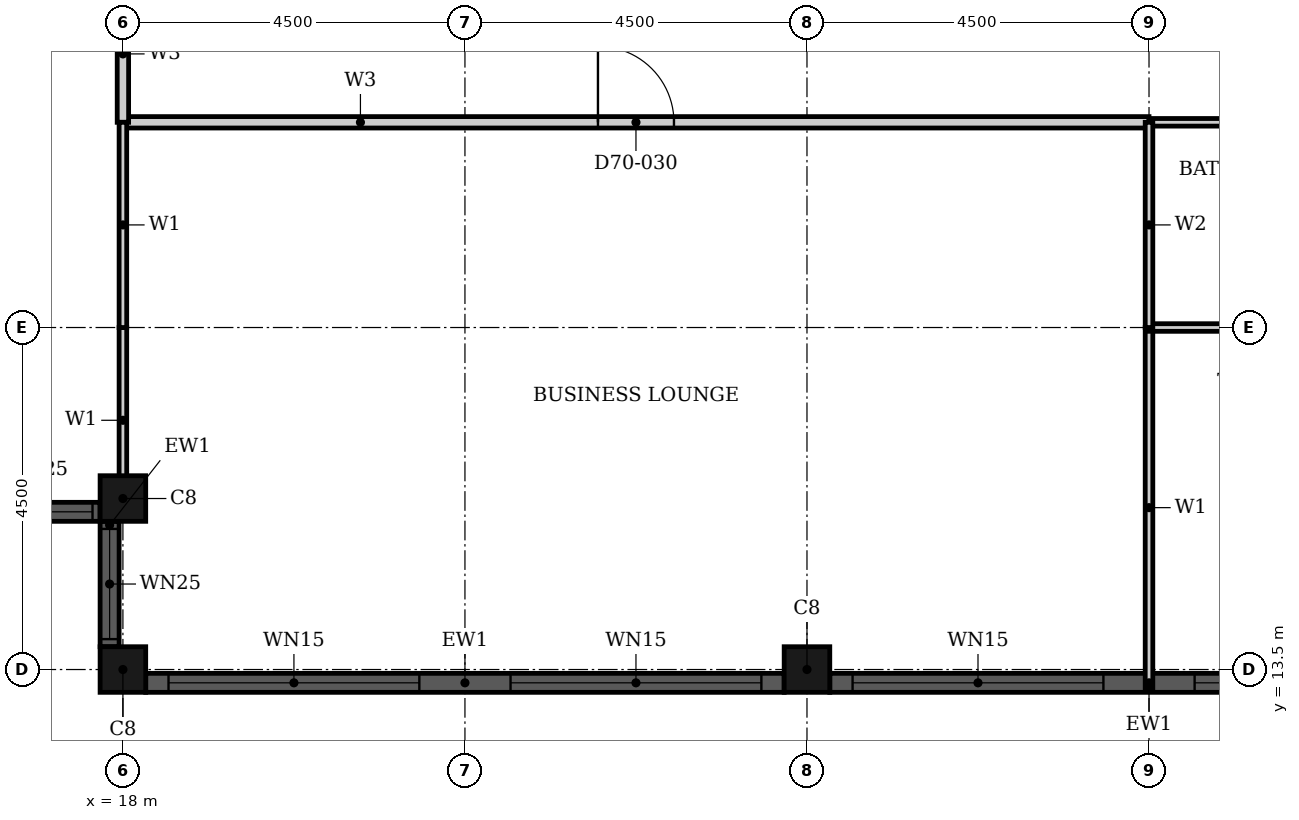
"""IFC4 building model, lengths in metres.
Left out: names, types, materials, properties, quantities, classifications, styles, units other than length and angle.
Written with IfcOpenShell. Run it as: python <this file> out.ifc"""

import sys

from ifc_helpers import new_model, si_unit, direction, frame, frame_2d, origin, origin_2d, place, context, subcontext, project, spatial, rectangle, hollow_rectangle, extrude, element, fill, save


model = new_model("IFC4")
c1 = context("Model", 3, precision=1e-05, world=origin(), true_north=direction((0.0, 1.0)))
c2 = subcontext(c1, "Body", "Model", "MODEL_VIEW")
j1 = project(units=[si_unit("LENGTHUNIT", "METRE"), si_unit("PLANEANGLEUNIT", "RADIAN")], contexts=[c1])
p1 = place(None, origin())
s1 = spatial("IfcSite", under=j1, at=p1, CompositionType="ELEMENT")
p2 = place(p1, origin())
s2 = spatial("IfcBuilding", under=s1, at=p2, CompositionType="ELEMENT")
p3 = place(p2, frame((0.0, 0.0, 274.9)))
s3 = spatial("IfcBuildingStorey", under=s2, at=p3, CompositionType="ELEMENT", Elevation=274.9)
for number, where, z_axis, x_axis in (
    (1, (18.0, 15.75, 0.0), (0.0, 0.0, 1.0), (1.0, 0.0, 0.0)),
    (2, (18.0, 13.5, 0.0), (0.0, 0.0, 1.0), (1.0, 0.0, 0.0)),
    (3, (27.0, 13.5, 0.0), (0.0, 0.0, 1.0), (1.0, 0.0, 0.0)),
):
    element("IfcColumn", number, at=place(p3, frame(where, z_axis=z_axis, x_axis=x_axis)), inside=s3, PredefinedType="COLUMN", context=c2, shape_type="SweptSolid", body=[
        extrude(hollow_rectangle(XDim=0.6, YDim=0.6, WallThickness=0.02, at=origin_2d()), origin(), (0.0, 0.0, 1.0), 3.7),
    ])
p4 = place(p3, frame((16.05, 15.575, 0.0), z_axis=(0.0, 0.0, 1.0), x_axis=(1.0, 0.0, 0.0)))
e4 = element("IfcWall", 4, at=p4, inside=s3, PredefinedType="SOLIDWALL", context=c2, shape_type="SweptSolid", body=[
    extrude(rectangle(XDim=1.65, YDim=0.25, at=frame_2d((0.825, 0.0))), origin(), (0.0, 0.0, 1.0), 3.7),
])
p5 = place(p4, frame((0.1, 0.0, 0.9)))
e5 = element("IfcOpeningElement", 5, at=p5, cuts=e4, PredefinedType="OPENING", context=c2, shape_type="SweptSolid", body=[
    extrude(rectangle(XDim=1.45, YDim=1.85, at=frame_2d((0.725, 0.925))), frame((0.0, 0.135, 0.0), z_axis=(0.0, -1.0, 0.0), x_axis=(1.0, 0.0, 0.0)), (0.0, 0.0, 1.0), 0.27),
])
p6 = place(p3, frame((17.825, 15.45, 0.0), z_axis=(0.0, 0.0, 1.0), x_axis=(0.0, -1.0, 0.0)))
e6 = element("IfcWall", 6, at=p6, inside=s3, PredefinedType="SOLIDWALL", context=c2, shape_type="SweptSolid", body=[
    extrude(rectangle(XDim=1.65, YDim=0.25, at=frame_2d((0.825, 0.0))), origin(), (0.0, 0.0, 1.0), 3.7),
])
p7 = place(p6, frame((0.1, 0.0, 0.9)))
e7 = element("IfcOpeningElement", 7, at=p7, cuts=e6, PredefinedType="OPENING", context=c2, shape_type="SweptSolid", body=[
    extrude(rectangle(XDim=1.45, YDim=1.85, at=frame_2d((0.725, 0.925))), frame((0.0, 0.135, 0.0), z_axis=(0.0, -1.0, 0.0), x_axis=(1.0, 0.0, 0.0)), (0.0, 0.0, 1.0), 0.27),
])
p8 = place(p3, frame((18.3, 13.325, 0.0), z_axis=(0.0, 0.0, 1.0), x_axis=(1.0, 0.0, 0.0)))
e8 = element("IfcWall", 8, at=p8, inside=s3, PredefinedType="SOLIDWALL", context=c2, shape_type="SweptSolid", body=[
    extrude(rectangle(XDim=8.4, YDim=0.25, at=frame_2d((4.2, 0.0))), origin(), (0.0, 0.0, 1.0), 3.7),
])
p9 = place(p8, frame((0.3, 0.0, 0.45)))
e9 = element("IfcOpeningElement", 9, at=p9, cuts=e8, PredefinedType="OPENING", context=c2, shape_type="SweptSolid", body=[
    extrude(rectangle(XDim=3.3, YDim=2.3, at=frame_2d((1.65, 1.15))), frame((0.0, 0.135, 0.0), z_axis=(0.0, -1.0, 0.0), x_axis=(1.0, 0.0, 0.0)), (0.0, 0.0, 1.0), 0.27),
])
p10 = place(p8, frame((4.8, 0.0, 0.45)))
e10 = element("IfcOpeningElement", 10, at=p10, cuts=e8, PredefinedType="OPENING", context=c2, shape_type="SweptSolid", body=[
    extrude(rectangle(XDim=3.3, YDim=2.3, at=frame_2d((1.65, 1.15))), frame((0.0, 0.135, 0.0), z_axis=(0.0, -1.0, 0.0), x_axis=(1.0, 0.0, 0.0)), (0.0, 0.0, 1.0), 0.27),
])
p11 = place(p3, frame((27.3, 13.325, 0.0), z_axis=(0.0, 0.0, 1.0), x_axis=(1.0, 0.0, 0.0)))
e11 = element("IfcWall", 11, at=p11, inside=s3, PredefinedType="SOLIDWALL", context=c2, shape_type="SweptSolid", body=[
    extrude(rectangle(XDim=8.4, YDim=0.25, at=frame_2d((4.2, 0.0))), origin(), (0.0, 0.0, 1.0), 3.7),
])
p12 = place(p11, frame((0.3, 0.0, 0.45)))
e12 = element("IfcOpeningElement", 12, at=p12, cuts=e11, PredefinedType="OPENING", context=c2, shape_type="SweptSolid", body=[
    extrude(rectangle(XDim=3.3, YDim=2.3, at=frame_2d((1.65, 1.15))), frame((0.0, 0.135, 0.0), z_axis=(0.0, -1.0, 0.0), x_axis=(1.0, 0.0, 0.0)), (0.0, 0.0, 1.0), 0.27),
])
p13 = place(p11, frame((4.8, 0.0, 0.45)))
e13 = element("IfcOpeningElement", 13, at=p13, cuts=e11, PredefinedType="OPENING", context=c2, shape_type="SweptSolid", body=[
    extrude(rectangle(XDim=3.3, YDim=2.3, at=frame_2d((1.65, 1.15))), frame((0.0, 0.135, 0.0), z_axis=(0.0, -1.0, 0.0), x_axis=(1.0, 0.0, 0.0)), (0.0, 0.0, 1.0), 0.27),
])
p14 = place(p3, frame((18.0, 20.7, 0.0), z_axis=(0.0, 0.0, 1.0), x_axis=(1.0, 0.0, 0.0)))
e14 = element("IfcWall", 14, at=p14, inside=s3, PredefinedType="PARTITIONING", context=c2, shape_type="SweptSolid", body=[
    extrude(rectangle(XDim=13.5, YDim=0.15, at=frame_2d((6.75, 0.0))), origin(), (0.0, 0.0, 1.0), 3.3),
])
p15 = place(p14, frame((6.25, 0.0, 0.0)))
e15 = element("IfcOpeningElement", 15, at=p15, cuts=e14, PredefinedType="OPENING", context=c2, shape_type="SweptSolid", body=[
    extrude(rectangle(XDim=1.0, YDim=2.1, at=frame_2d((0.5, 1.05))), frame((0.0, 0.085, 0.0), z_axis=(0.0, -1.0, 0.0), x_axis=(1.0, 0.0, 0.0)), (0.0, 0.0, 1.0), 0.17),
])
p16 = place(p3, frame((18.0, 20.7, 0.0), z_axis=(0.0, 0.0, 1.0), x_axis=(0.0, 1.0, 0.0)))
e16 = element("IfcWall", 16, at=p16, inside=s3, PredefinedType="PARTITIONING", context=c2, shape_type="SweptSolid", body=[
    extrude(rectangle(XDim=1.8, YDim=0.15, at=frame_2d((0.9, 0.0))), origin(), (0.0, 0.0, 1.0), 3.3),
])
p17 = place(p3, frame((18.0, 15.56, 0.0), z_axis=(0.0, 0.0, 1.0), x_axis=(0.0, 1.0, 0.0)))
e17 = element("IfcWall", 17, at=p17, inside=s3, PredefinedType="PARTITIONING", context=c2, shape_type="SweptSolid", body=[
    extrude(rectangle(XDim=2.439, YDim=0.1, at=frame_2d((1.219, 0.0))), origin(), (0.0, 0.0, 1.0), 3.3),
])
p18 = place(p3, frame((18.0, 18.0, 0.0), z_axis=(0.0, 0.0, 1.0), x_axis=(0.0, 1.0, 0.0)))
e18 = element("IfcWall", 18, at=p18, inside=s3, PredefinedType="PARTITIONING", context=c2, shape_type="SweptSolid", body=[
    extrude(rectangle(XDim=2.7, YDim=0.1, at=frame_2d((1.35, 0.0))), origin(), (0.0, 0.0, 1.0), 3.3),
])
p19 = place(p3, frame((31.5, 13.26, 0.0), z_axis=(0.0, 0.0, 1.0), x_axis=(0.0, 1.0, 0.0)))
e19 = element("IfcWall", 19, at=p19, inside=s3, PredefinedType="PARTITIONING", context=c2, shape_type="SweptSolid", body=[
    extrude(rectangle(XDim=4.74, YDim=0.1, at=frame_2d((2.37, 0.0))), origin(), (0.0, 0.0, 1.0), 3.3),
])
for number, where, z_axis, x_axis in (
    (20, (31.5, 18.0, 0.0), (0.0, 0.0, 1.0), (1.0, 0.0, 0.0)),
    (21, (31.5, 20.7, 0.0), (0.0, 0.0, 1.0), (1.0, 0.0, 0.0)),
):
    element("IfcWall", number, at=place(p3, frame(where, z_axis=z_axis, x_axis=x_axis)), inside=s3, PredefinedType="PARTITIONING", context=c2, shape_type="SweptSolid", body=[
        extrude(rectangle(XDim=2.4, YDim=0.1, at=frame_2d((1.2, 0.0))), origin(), (0.0, 0.0, 1.0), 3.3),
    ])
p20 = place(p3, frame((31.5, 18.0, 0.0), z_axis=(0.0, 0.0, 1.0), x_axis=(0.0, 1.0, 0.0)))
e22 = element("IfcWall", 22, at=p20, inside=s3, PredefinedType="PARTITIONING", context=c2, shape_type="SweptSolid", body=[
    extrude(rectangle(XDim=2.7, YDim=0.1, at=frame_2d((1.35, 0.0))), origin(), (0.0, 0.0, 1.0), 3.3),
])
p21 = place(p5, origin())
e23 = element("IfcWindow", 23, at=p21, inside=s3, PartitioningType="SINGLE_PANEL", PredefinedType="WINDOW", context=c2, shape_type="SweptSolid", body=[
    extrude(rectangle(XDim=1.45, YDim=1.85, at=frame_2d((0.725, 0.925))), frame((0.0, 0.03, 0.0), z_axis=(0.0, -1.0, 0.0), x_axis=(1.0, 0.0, 0.0)), (0.0, 0.0, 1.0), 0.06),
])
fill(e5, e23)
p22 = place(p7, origin())
e24 = element("IfcWindow", 24, at=p22, inside=s3, PartitioningType="SINGLE_PANEL", PredefinedType="WINDOW", context=c2, shape_type="SweptSolid", body=[
    extrude(rectangle(XDim=1.45, YDim=1.85, at=frame_2d((0.725, 0.925))), frame((0.0, 0.03, 0.0), z_axis=(0.0, -1.0, 0.0), x_axis=(1.0, 0.0, 0.0)), (0.0, 0.0, 1.0), 0.06),
])
fill(e7, e24)
p23 = place(p9, origin())
e25 = element("IfcWindow", 25, at=p23, inside=s3, PartitioningType="SINGLE_PANEL", PredefinedType="WINDOW", context=c2, shape_type="SweptSolid", body=[
    extrude(rectangle(XDim=3.3, YDim=2.3, at=frame_2d((1.65, 1.15))), frame((0.0, 0.03, 0.0), z_axis=(0.0, -1.0, 0.0), x_axis=(1.0, 0.0, 0.0)), (0.0, 0.0, 1.0), 0.06),
])
fill(e9, e25)
p24 = place(p10, origin())
e26 = element("IfcWindow", 26, at=p24, inside=s3, PartitioningType="SINGLE_PANEL", PredefinedType="WINDOW", context=c2, shape_type="SweptSolid", body=[
    extrude(rectangle(XDim=3.3, YDim=2.3, at=frame_2d((1.65, 1.15))), frame((0.0, 0.03, 0.0), z_axis=(0.0, -1.0, 0.0), x_axis=(1.0, 0.0, 0.0)), (0.0, 0.0, 1.0), 0.06),
])
fill(e10, e26)
p25 = place(p12, origin())
e27 = element("IfcWindow", 27, at=p25, inside=s3, PartitioningType="SINGLE_PANEL", PredefinedType="WINDOW", context=c2, shape_type="SweptSolid", body=[
    extrude(rectangle(XDim=3.3, YDim=2.3, at=frame_2d((1.65, 1.15))), frame((0.0, 0.03, 0.0), z_axis=(0.0, -1.0, 0.0), x_axis=(1.0, 0.0, 0.0)), (0.0, 0.0, 1.0), 0.06),
])
fill(e12, e27)
p26 = place(p13, origin())
e28 = element("IfcWindow", 28, at=p26, inside=s3, PartitioningType="SINGLE_PANEL", PredefinedType="WINDOW", context=c2, shape_type="SweptSolid", body=[
    extrude(rectangle(XDim=3.3, YDim=2.3, at=frame_2d((1.65, 1.15))), frame((0.0, 0.03, 0.0), z_axis=(0.0, -1.0, 0.0), x_axis=(1.0, 0.0, 0.0)), (0.0, 0.0, 1.0), 0.06),
])
fill(e13, e28)
p27 = place(p15, origin())
e29 = element("IfcDoor", 29, at=p27, inside=s3, OperationType="SINGLE_SWING_LEFT", PredefinedType="DOOR", context=c2, shape_type="SweptSolid", body=[
    extrude(rectangle(XDim=1.0, YDim=2.1, at=frame_2d((0.5, 1.05))), frame((0.0, 0.025, 0.0), z_axis=(0.0, -1.0, 0.0), x_axis=(1.0, 0.0, 0.0)), (0.0, 0.0, 1.0), 0.05),
])
fill(e15, e29)
save(model, sys.argv[1])
